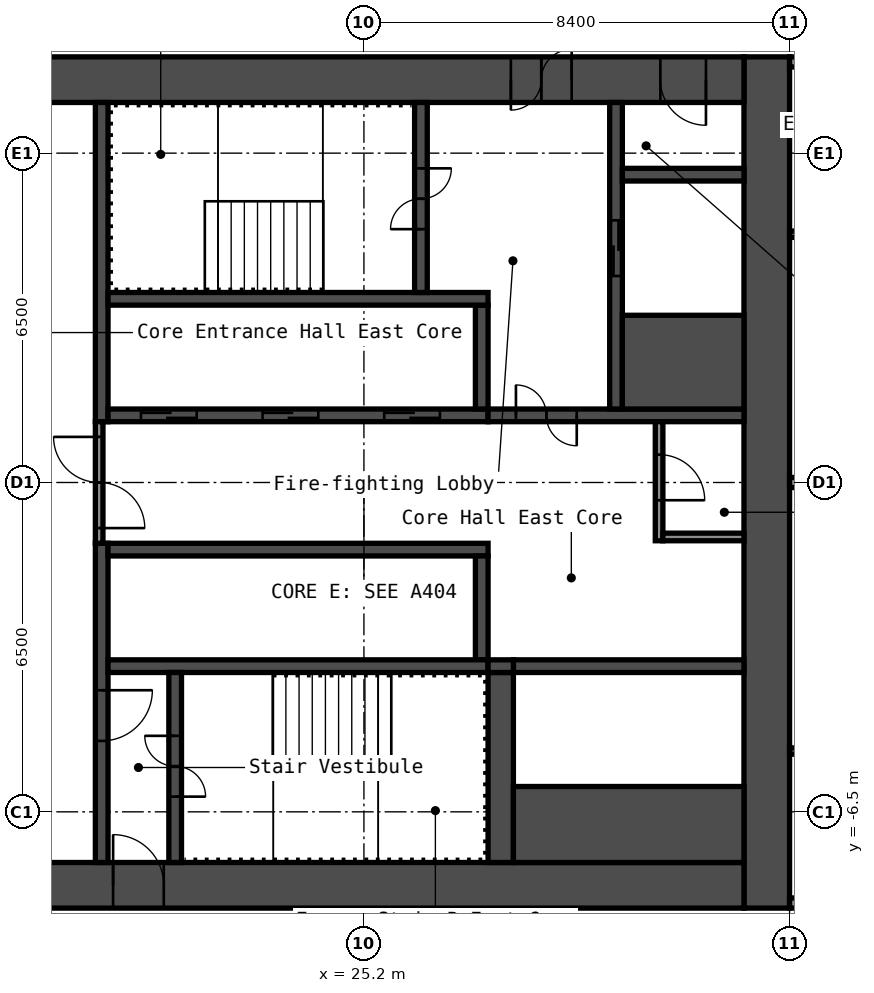
"""IFC4 building model, lengths in metres.
Left out: names, types, materials, properties, quantities, classifications, styles, units other than length and angle.
Written with IfcOpenShell. Run it as: python <this file> out.ifc"""

import sys

from ifc_helpers import new_model, si_unit, direction, frame, frame_2d, origin, place, context, subcontext, project, spatial, rectangle, extrude, element, fill, save


model = new_model("IFC4")
c1 = context("Model", 3, precision=1e-05, world=origin(), true_north=direction((0.0, 1.0)))
c2 = subcontext(c1, "Body", "Model", "MODEL_VIEW")
j1 = project(units=[si_unit("LENGTHUNIT", "METRE"), si_unit("PLANEANGLEUNIT", "RADIAN")], contexts=[c1])
p1 = place(None, origin())
s1 = spatial("IfcSite", under=j1, at=p1, CompositionType="ELEMENT")
p2 = place(p1, origin())
s2 = spatial("IfcBuilding", under=s1, at=p2, CompositionType="ELEMENT")
p3 = place(p2, frame((0.0, 0.0, 26.2)))
s3 = spatial("IfcBuildingStorey", under=s2, at=p3, CompositionType="ELEMENT", Elevation=26.2)
p4 = place(p3, frame((33.15, -8.4, 0.0), z_axis=(0.0, 0.0, 1.0), x_axis=(0.0, 1.0, 0.0)))
e1 = element("IfcWall", 1, at=p4, inside=s3, PredefinedType="SHEAR", context=c2, shape_type="SweptSolid", body=[
    extrude(rectangle(XDim=16.8, YDim=0.9, at=frame_2d((8.4, 0.0))), origin(), (0.0, 0.0, 1.0), 2.8),
])
p5 = place(p3, frame((17.7, 7.95, 0.0), z_axis=(0.0, 0.0, 1.0), x_axis=(1.0, 0.0, 0.0)))
e2 = element("IfcWall", 2, at=p5, inside=s3, PredefinedType="SHEAR", context=c2, shape_type="SweptSolid", body=[
    extrude(rectangle(XDim=15.0, YDim=0.9, at=frame_2d((7.5, 0.0))), origin(), (0.0, 0.0, 1.0), 2.8),
])
p6 = place(p5, frame((10.4, 0.0, 0.0)))
e3 = element("IfcOpeningElement", 3, at=p6, cuts=e2, PredefinedType="OPENING", context=c2, shape_type="SweptSolid", body=[
    extrude(rectangle(XDim=1.2, YDim=2.1, at=frame_2d((0.6, 1.05))), frame((0.0, 0.46, 0.0), z_axis=(0.0, -1.0, 0.0), x_axis=(1.0, 0.0, 0.0)), (0.0, 0.0, 1.0), 0.92),
])
p7 = place(p5, frame((13.35, 0.0, 0.0)))
e4 = element("IfcOpeningElement", 4, at=p7, cuts=e2, PredefinedType="OPENING", context=c2, shape_type="SweptSolid", body=[
    extrude(rectangle(XDim=0.9, YDim=2.1, at=frame_2d((0.45, 1.05))), frame((0.0, 0.46, 0.0), z_axis=(0.0, -1.0, 0.0), x_axis=(1.0, 0.0, 0.0)), (0.0, 0.0, 1.0), 0.92),
])
p8 = place(p3, frame((17.7, -7.95, 0.0), z_axis=(0.0, 0.0, 1.0), x_axis=(1.0, 0.0, 0.0)))
e5 = element("IfcWall", 5, at=p8, inside=s3, PredefinedType="SHEAR", context=c2, shape_type="SweptSolid", body=[
    extrude(rectangle(XDim=15.0, YDim=0.9, at=frame_2d((7.5, 0.0))), origin(), (0.0, 0.0, 1.0), 2.8),
])
p9 = place(p8, frame((2.55, 0.0, 0.0)))
e6 = element("IfcOpeningElement", 6, at=p9, cuts=e5, PredefinedType="OPENING", context=c2, shape_type="SweptSolid", body=[
    extrude(rectangle(XDim=1.0, YDim=2.1, at=frame_2d((0.5, 1.05))), frame((0.0, 0.46, 0.0), z_axis=(0.0, -1.0, 0.0), x_axis=(1.0, 0.0, 0.0)), (0.0, 0.0, 1.0), 0.92),
])
p10 = place(p3, frame((20.025, 1.2, 0.0), z_axis=(0.0, 0.0, 1.0), x_axis=(0.0, 1.0, 0.0)))
e7 = element("IfcWall", 7, at=p10, inside=s3, PredefinedType="SHEAR", context=c2, shape_type="SweptSolid", body=[
    extrude(rectangle(XDim=6.3, YDim=0.25, at=frame_2d((3.15, 0.0))), origin(), (0.0, 0.0, 1.0), 2.8),
])
p11 = place(p3, frame((20.025, -7.5, 0.0), z_axis=(0.0, 0.0, 1.0), x_axis=(0.0, 1.0, 0.0)))
e8 = element("IfcWall", 8, at=p11, inside=s3, PredefinedType="SHEAR", context=c2, shape_type="SweptSolid", body=[
    extrude(rectangle(XDim=6.3, YDim=0.25, at=frame_2d((3.15, 0.0))), origin(), (0.0, 0.0, 1.0), 2.8),
])
p12 = place(p11, frame((2.4, 0.0, 0.0)))
e9 = element("IfcOpeningElement", 9, at=p12, cuts=e8, PredefinedType="OPENING", context=c2, shape_type="SweptSolid", body=[
    extrude(rectangle(XDim=1.0, YDim=2.1, at=frame_2d((0.5, 1.05))), frame((0.0, 0.135, 0.0), z_axis=(0.0, -1.0, 0.0), x_axis=(1.0, 0.0, 0.0)), (0.0, 0.0, 1.0), 0.27),
])
p13 = place(p3, frame((20.15, 1.325, 0.0), z_axis=(0.0, 0.0, 1.0), x_axis=(1.0, 0.0, 0.0)))
e10 = element("IfcWall", 10, at=p13, inside=s3, PredefinedType="SHEAR", context=c2, shape_type="SweptSolid", body=[
    extrude(rectangle(XDim=7.5, YDim=0.25, at=frame_2d((3.75, 0.0))), origin(), (0.0, 0.0, 1.0), 2.8),
])
p14 = place(p13, frame((0.65, 0.0, 0.0)))
e11 = element("IfcOpeningElement", 11, at=p14, cuts=e10, PredefinedType="OPENING", context=c2, shape_type="SweptSolid", body=[
    extrude(rectangle(XDim=1.1, YDim=2.1, at=frame_2d((0.55, 1.05))), frame((0.0, 0.135, 0.0), z_axis=(0.0, -1.0, 0.0), x_axis=(1.0, 0.0, 0.0)), (0.0, 0.0, 1.0), 0.27),
])
p15 = place(p13, frame((3.05, 0.0, 0.0)))
e12 = element("IfcOpeningElement", 12, at=p15, cuts=e10, PredefinedType="OPENING", context=c2, shape_type="SweptSolid", body=[
    extrude(rectangle(XDim=1.1, YDim=2.1, at=frame_2d((0.55, 1.05))), frame((0.0, 0.135, 0.0), z_axis=(0.0, -1.0, 0.0), x_axis=(1.0, 0.0, 0.0)), (0.0, 0.0, 1.0), 0.27),
])
p16 = place(p13, frame((5.45, 0.0, 0.0)))
e13 = element("IfcOpeningElement", 13, at=p16, cuts=e10, PredefinedType="OPENING", context=c2, shape_type="SweptSolid", body=[
    extrude(rectangle(XDim=1.1, YDim=2.1, at=frame_2d((0.55, 1.05))), frame((0.0, 0.135, 0.0), z_axis=(0.0, -1.0, 0.0), x_axis=(1.0, 0.0, 0.0)), (0.0, 0.0, 1.0), 0.27),
])
p17 = place(p3, frame((27.525, 1.45, 0.0), z_axis=(0.0, 0.0, 1.0), x_axis=(0.0, 1.0, 0.0)))
e14 = element("IfcWall", 14, at=p17, inside=s3, PredefinedType="SHEAR", context=c2, shape_type="SweptSolid", body=[
    extrude(rectangle(XDim=2.05, YDim=0.25, at=frame_2d((1.025, 0.0))), origin(), (0.0, 0.0, 1.0), 2.8),
])
p18 = place(p3, frame((20.15, 3.625, 0.0), z_axis=(0.0, 0.0, 1.0), x_axis=(1.0, 0.0, 0.0)))
e15 = element("IfcWall", 15, at=p18, inside=s3, PredefinedType="SHEAR", context=c2, shape_type="SweptSolid", body=[
    extrude(rectangle(XDim=7.5, YDim=0.25, at=frame_2d((3.75, 0.0))), origin(), (0.0, 0.0, 1.0), 2.8),
])
p19 = place(p3, frame((26.325, 3.75, 0.0), z_axis=(0.0, 0.0, 1.0), x_axis=(0.0, 1.0, 0.0)))
e16 = element("IfcWall", 16, at=p19, inside=s3, PredefinedType="SHEAR", context=c2, shape_type="SweptSolid", body=[
    extrude(rectangle(XDim=3.75, YDim=0.25, at=frame_2d((1.875, 0.0))), origin(), (0.0, 0.0, 1.0), 2.8),
])
p20 = place(p19, frame((1.25, 0.0, 0.0)))
e17 = element("IfcOpeningElement", 17, at=p20, cuts=e16, PredefinedType="OPENING", context=c2, shape_type="SweptSolid", body=[
    extrude(rectangle(XDim=1.2, YDim=2.1, at=frame_2d((0.6, 1.05))), frame((0.0, 0.135, 0.0), z_axis=(0.0, -1.0, 0.0), x_axis=(1.0, 0.0, 0.0)), (0.0, 0.0, 1.0), 0.27),
])
p21 = place(p3, frame((27.65, 1.325, 0.0), z_axis=(0.0, 0.0, 1.0), x_axis=(1.0, 0.0, 0.0)))
e18 = element("IfcWall", 18, at=p21, inside=s3, PredefinedType="SHEAR", context=c2, shape_type="SweptSolid", body=[
    extrude(rectangle(XDim=5.05, YDim=0.25, at=frame_2d((2.525, 0.0))), origin(), (0.0, 0.0, 1.0), 2.8),
])
p22 = place(p21, frame((0.55, 0.0, 0.0)))
e19 = element("IfcOpeningElement", 19, at=p22, cuts=e18, PredefinedType="OPENING", context=c2, shape_type="SweptSolid", body=[
    extrude(rectangle(XDim=1.2, YDim=2.1, at=frame_2d((0.6, 1.05))), frame((0.0, 0.135, 0.0), z_axis=(0.0, -1.0, 0.0), x_axis=(1.0, 0.0, 0.0)), (0.0, 0.0, 1.0), 0.27),
])
p23 = place(p3, frame((30.175, 1.45, 0.0), z_axis=(0.0, 0.0, 1.0), x_axis=(0.0, 1.0, 0.0)))
e20 = element("IfcWall", 20, at=p23, inside=s3, PredefinedType="SHEAR", context=c2, shape_type="SweptSolid", body=[
    extrude(rectangle(XDim=6.05, YDim=0.25, at=frame_2d((3.025, 0.0))), origin(), (0.0, 0.0, 1.0), 2.8),
])
p24 = place(p23, frame((2.625, 0.0, 0.0)))
e21 = element("IfcOpeningElement", 21, at=p24, cuts=e20, PredefinedType="OPENING", context=c2, shape_type="SweptSolid", body=[
    extrude(rectangle(XDim=1.1, YDim=2.1, at=frame_2d((0.55, 1.05))), frame((0.0, 0.135, 0.0), z_axis=(0.0, -1.0, 0.0), x_axis=(1.0, 0.0, 0.0)), (0.0, 0.0, 1.0), 0.27),
])
p25 = place(p3, frame((30.3, 2.375, 0.0), z_axis=(0.0, 0.0, 1.0), x_axis=(1.0, 0.0, 0.0)))
e22 = element("IfcWall", 22, at=p25, inside=s3, PredefinedType="SHEAR", context=c2, shape_type="SweptSolid", body=[
    extrude(rectangle(XDim=2.4, YDim=1.85, at=frame_2d((1.2, 0.0))), origin(), (0.0, 0.0, 1.0), 2.8),
])
p26 = place(p3, frame((30.3, 6.075, 0.0), z_axis=(0.0, 0.0, 1.0), x_axis=(1.0, 0.0, 0.0)))
e23 = element("IfcWall", 23, at=p26, inside=s3, PredefinedType="SHEAR", context=c2, shape_type="SweptSolid", body=[
    extrude(rectangle(XDim=2.4, YDim=0.25, at=frame_2d((1.2, 0.0))), origin(), (0.0, 0.0, 1.0), 2.8),
])
p27 = place(p3, frame((20.15, -1.325, 0.0), z_axis=(0.0, 0.0, 1.0), x_axis=(1.0, 0.0, 0.0)))
e24 = element("IfcWall", 24, at=p27, inside=s3, PredefinedType="SHEAR", context=c2, shape_type="SweptSolid", body=[
    extrude(rectangle(XDim=7.5, YDim=0.25, at=frame_2d((3.75, 0.0))), origin(), (0.0, 0.0, 1.0), 2.8),
])
p28 = place(p3, frame((27.525, -3.5, 0.0), z_axis=(0.0, 0.0, 1.0), x_axis=(0.0, 1.0, 0.0)))
e25 = element("IfcWall", 25, at=p28, inside=s3, PredefinedType="SHEAR", context=c2, shape_type="SweptSolid", body=[
    extrude(rectangle(XDim=2.05, YDim=0.25, at=frame_2d((1.025, 0.0))), origin(), (0.0, 0.0, 1.0), 2.8),
])
p29 = place(p3, frame((20.15, -3.625, 0.0), z_axis=(0.0, 0.0, 1.0), x_axis=(1.0, 0.0, 0.0)))
e26 = element("IfcWall", 26, at=p29, inside=s3, PredefinedType="SHEAR", context=c2, shape_type="SweptSolid", body=[
    extrude(rectangle(XDim=7.5, YDim=0.25, at=frame_2d((3.75, 0.0))), origin(), (0.0, 0.0, 1.0), 2.8),
])
p30 = place(p3, frame((21.475, -7.5, 0.0), z_axis=(0.0, 0.0, 1.0), x_axis=(0.0, 1.0, 0.0)))
e27 = element("IfcWall", 27, at=p30, inside=s3, PredefinedType="SHEAR", context=c2, shape_type="SweptSolid", body=[
    extrude(rectangle(XDim=3.75, YDim=0.25, at=frame_2d((1.875, 0.0))), origin(), (0.0, 0.0, 1.0), 2.8),
])
p31 = place(p30, frame((1.3, 0.0, 0.0)))
e28 = element("IfcOpeningElement", 28, at=p31, cuts=e27, PredefinedType="OPENING", context=c2, shape_type="SweptSolid", body=[
    extrude(rectangle(XDim=1.2, YDim=2.1, at=frame_2d((0.6, 1.05))), frame((0.0, 0.135, 0.0), z_axis=(0.0, -1.0, 0.0), x_axis=(1.0, 0.0, 0.0)), (0.0, 0.0, 1.0), 0.27),
])
p32 = place(p3, frame((27.9, -7.5, 0.0), z_axis=(0.0, 0.0, 1.0), x_axis=(0.0, 1.0, 0.0)))
e29 = element("IfcWall", 29, at=p32, inside=s3, PredefinedType="SHEAR", context=c2, shape_type="SweptSolid", body=[
    extrude(rectangle(XDim=3.75, YDim=0.5, at=frame_2d((1.875, 0.0))), origin(), (0.0, 0.0, 1.0), 2.8),
])
p33 = place(p3, frame((28.15, -3.625, 0.0), z_axis=(0.0, 0.0, 1.0), x_axis=(1.0, 0.0, 0.0)))
e30 = element("IfcWall", 30, at=p33, inside=s3, PredefinedType="SHEAR", context=c2, shape_type="SweptSolid", body=[
    extrude(rectangle(XDim=4.55, YDim=0.25, at=frame_2d((2.275, 0.0))), origin(), (0.0, 0.0, 1.0), 2.8),
])
p34 = place(p3, frame((28.15, -6.75, 0.0), z_axis=(0.0, 0.0, 1.0), x_axis=(1.0, 0.0, 0.0)))
e31 = element("IfcWall", 31, at=p34, inside=s3, PredefinedType="SHEAR", context=c2, shape_type="SweptSolid", body=[
    extrude(rectangle(XDim=4.55, YDim=1.5, at=frame_2d((2.275, 0.0))), origin(), (0.0, 0.0, 1.0), 2.8),
])
p35 = place(p3, frame((27.65, -3.625, 0.0), z_axis=(0.0, 0.0, 1.0), x_axis=(1.0, 0.0, 0.0)))
e32 = element("IfcWall", 32, at=p35, inside=s3, PredefinedType="SHEAR", context=c2, shape_type="SweptSolid", body=[
    extrude(rectangle(XDim=0.5, YDim=0.25, at=frame_2d((0.25, 0.0))), origin(), (0.0, 0.0, 1.0), 2.8),
])
p36 = place(p3, frame((19.975, -1.2, 0.0), z_axis=(0.0, 0.0, 1.0), x_axis=(0.0, 1.0, 0.0)))
e33 = element("IfcWall", 33, at=p36, inside=s3, PredefinedType="PARTITIONING", context=c2, shape_type="SweptSolid", body=[
    extrude(rectangle(XDim=2.4, YDim=0.15, at=frame_2d((1.2, 0.0))), origin(), (0.0, 0.0, 1.0), 2.8),
])
p37 = place(p36, frame((0.3, 0.0, 0.0)))
e34 = element("IfcOpeningElement", 34, at=p37, cuts=e33, PredefinedType="OPENING", context=c2, shape_type="SweptSolid", body=[
    extrude(rectangle(XDim=1.8, YDim=2.1, at=frame_2d((0.9, 1.05))), frame((0.0, 0.085, 0.0), z_axis=(0.0, -1.0, 0.0), x_axis=(1.0, 0.0, 0.0)), (0.0, 0.0, 1.0), 0.17),
])
p38 = place(p3, frame((31.025, -1.15, 0.0), z_axis=(0.0, 0.0, 1.0), x_axis=(0.0, 1.0, 0.0)))
e35 = element("IfcWall", 35, at=p38, inside=s3, PredefinedType="PARTITIONING", context=c2, shape_type="SweptSolid", body=[
    extrude(rectangle(XDim=2.35, YDim=0.15, at=frame_2d((1.175, 0.0))), origin(), (0.0, 0.0, 1.0), 2.8),
])
p39 = place(p38, frame((0.8, 0.0, 0.0)))
e36 = element("IfcOpeningElement", 36, at=p39, cuts=e35, PredefinedType="OPENING", context=c2, shape_type="SweptSolid", body=[
    extrude(rectangle(XDim=0.9, YDim=2.1, at=frame_2d((0.45, 1.05))), frame((0.0, 0.085, 0.0), z_axis=(0.0, -1.0, 0.0), x_axis=(1.0, 0.0, 0.0)), (0.0, 0.0, 1.0), 0.17),
])
p40 = place(p3, frame((31.1, -1.075, 0.0), z_axis=(0.0, 0.0, 1.0), x_axis=(1.0, 0.0, 0.0)))
e37 = element("IfcWall", 37, at=p40, inside=s3, PredefinedType="PARTITIONING", context=c2, shape_type="SweptSolid", body=[
    extrude(rectangle(XDim=1.6, YDim=0.15, at=frame_2d((0.8, 0.0))), origin(), (0.0, 0.0, 1.0), 2.8),
])
p41 = place(p3, frame((33.6, -8.3, 0.0), z_axis=(0.0, 0.0, 1.0), x_axis=(1.0, 0.0, 0.0)))
e38 = element("IfcWall", 38, at=p41, inside=s3, PredefinedType="PARTITIONING", context=c2, shape_type="SweptSolid", body=[
    extrude(rectangle(XDim=15.0, YDim=0.2, at=frame_2d((7.5, 0.0))), origin(), (0.0, 0.0, 1.0), 2.8),
])
p42 = place(p41, frame((2.85, 0.0, 0.0)))
e39 = element("IfcOpeningElement", 39, at=p42, cuts=e38, PredefinedType="OPENING", context=c2, shape_type="SweptSolid", body=[
    extrude(rectangle(XDim=1.0, YDim=2.1, at=frame_2d((0.5, 1.05))), frame((0.0, 0.11, 0.0), z_axis=(0.0, -1.0, 0.0), x_axis=(1.0, 0.0, 0.0)), (0.0, 0.0, 1.0), 0.22),
])
p43 = place(p41, frame((4.55, 0.0, 0.0)))
e40 = element("IfcOpeningElement", 40, at=p43, cuts=e38, PredefinedType="OPENING", context=c2, shape_type="SweptSolid", body=[
    extrude(rectangle(XDim=1.0, YDim=2.1, at=frame_2d((0.5, 1.05))), frame((0.0, 0.11, 0.0), z_axis=(0.0, -1.0, 0.0), x_axis=(1.0, 0.0, 0.0)), (0.0, 0.0, 1.0), 0.22),
])
p44 = place(p41, frame((9.55, 0.0, 0.0)))
e41 = element("IfcOpeningElement", 41, at=p44, cuts=e38, PredefinedType="OPENING", context=c2, shape_type="SweptSolid", body=[
    extrude(rectangle(XDim=1.0, YDim=2.1, at=frame_2d((0.5, 1.05))), frame((0.0, 0.11, 0.0), z_axis=(0.0, -1.0, 0.0), x_axis=(1.0, 0.0, 0.0)), (0.0, 0.0, 1.0), 0.22),
])
p45 = place(p3, frame((33.6, -5.3, 0.0), z_axis=(0.0, 0.0, 1.0), x_axis=(1.0, 0.0, 0.0)))
e42 = element("IfcWall", 42, at=p45, inside=s3, PredefinedType="PARTITIONING", context=c2, shape_type="SweptSolid", body=[
    extrude(rectangle(XDim=2.438, YDim=0.125, at=frame_2d((1.219, 0.0))), origin(), (0.0, 0.0, 1.0), 2.8),
])
p46 = place(p3, frame((33.6, 0.0, 0.0), z_axis=(0.0, 0.0, 1.0), x_axis=(1.0, 0.0, 0.0)))
e43 = element("IfcWall", 43, at=p46, inside=s3, PredefinedType="PARTITIONING", context=c2, shape_type="SweptSolid", body=[
    extrude(rectangle(XDim=14.9, YDim=0.2, at=frame_2d((7.45, 0.0))), origin(), (0.0, 0.0, 1.0), 2.8),
])
p47 = place(p3, frame((33.6, 4.9, 0.0), z_axis=(0.0, 0.0, 1.0), x_axis=(1.0, 0.0, 0.0)))
e44 = element("IfcWall", 44, at=p47, inside=s3, PredefinedType="PARTITIONING", context=c2, shape_type="SweptSolid", body=[
    extrude(rectangle(XDim=3.337, YDim=0.125, at=frame_2d((1.669, 0.0))), origin(), (0.0, 0.0, 1.0), 2.8),
])
p48 = place(p47, frame((1.3, 0.0, 0.0)))
e45 = element("IfcOpeningElement", 45, at=p48, cuts=e44, PredefinedType="OPENING", context=c2, shape_type="SweptSolid", body=[
    extrude(rectangle(XDim=0.8, YDim=2.1, at=frame_2d((0.4, 1.05))), frame((0.0, 0.073, 0.0), z_axis=(0.0, -1.0, 0.0), x_axis=(1.0, 0.0, 0.0)), (0.0, 0.0, 1.0), 0.145),
])
p49 = place(p3, frame((33.6, 8.3, 0.0), z_axis=(0.0, 0.0, 1.0), x_axis=(1.0, 0.0, 0.0)))
e46 = element("IfcWall", 46, at=p49, inside=s3, PredefinedType="PARTITIONING", context=c2, shape_type="SweptSolid", body=[
    extrude(rectangle(XDim=15.0, YDim=0.2, at=frame_2d((7.5, 0.0))), origin(), (0.0, 0.0, 1.0), 2.8),
])
p50 = place(p49, frame((5.4, 0.0, 0.0)))
e47 = element("IfcOpeningElement", 47, at=p50, cuts=e46, PredefinedType="OPENING", context=c2, shape_type="SweptSolid", body=[
    extrude(rectangle(XDim=1.0, YDim=2.1, at=frame_2d((0.5, 1.05))), frame((0.0, 0.11, 0.0), z_axis=(0.0, -1.0, 0.0), x_axis=(1.0, 0.0, 0.0)), (0.0, 0.0, 1.0), 0.22),
])
p51 = place(p49, frame((9.55, 0.0, 0.0)))
e48 = element("IfcOpeningElement", 48, at=p51, cuts=e46, PredefinedType="OPENING", context=c2, shape_type="SweptSolid", body=[
    extrude(rectangle(XDim=1.0, YDim=2.1, at=frame_2d((0.5, 1.05))), frame((0.0, 0.11, 0.0), z_axis=(0.0, -1.0, 0.0), x_axis=(1.0, 0.0, 0.0)), (0.0, 0.0, 1.0), 0.22),
])
p52 = place(p6, origin())
e49 = element("IfcDoor", 49, at=p52, inside=s3, OperationType="DOUBLE_DOOR_SINGLE_SWING", PredefinedType="DOOR", context=c2, shape_type="SweptSolid", body=[
    extrude(rectangle(XDim=1.2, YDim=2.1, at=frame_2d((0.6, 1.05))), frame((0.0, 0.025, 0.0), z_axis=(0.0, -1.0, 0.0), x_axis=(1.0, 0.0, 0.0)), (0.0, 0.0, 1.0), 0.05),
])
fill(e3, e49)
p53 = place(p7, origin())
e50 = element("IfcDoor", 50, at=p53, inside=s3, OperationType="SINGLE_SWING_RIGHT", PredefinedType="DOOR", context=c2, shape_type="SweptSolid", body=[
    extrude(rectangle(XDim=0.9, YDim=2.1, at=frame_2d((0.45, 1.05))), frame((0.0, 0.025, 0.0), z_axis=(0.0, -1.0, 0.0), x_axis=(1.0, 0.0, 0.0)), (0.0, 0.0, 1.0), 0.05),
])
fill(e4, e50)
p54 = place(p9, origin())
e51 = element("IfcDoor", 51, at=p54, inside=s3, OperationType="SINGLE_SWING_RIGHT", PredefinedType="DOOR", context=c2, shape_type="SweptSolid", body=[
    extrude(rectangle(XDim=1.0, YDim=2.1, at=frame_2d((0.5, 1.05))), frame((0.0, 0.025, 0.0), z_axis=(0.0, -1.0, 0.0), x_axis=(1.0, 0.0, 0.0)), (0.0, 0.0, 1.0), 0.05),
])
fill(e6, e51)
p55 = place(p20, origin())
e52 = element("IfcDoor", 52, at=p55, inside=s3, OperationType="DOUBLE_DOOR_SINGLE_SWING", PredefinedType="DOOR", context=c2, shape_type="SweptSolid", body=[
    extrude(rectangle(XDim=1.2, YDim=2.1, at=frame_2d((0.6, 1.05))), frame((0.0, 0.025, 0.0), z_axis=(0.0, -1.0, 0.0), x_axis=(1.0, 0.0, 0.0)), (0.0, 0.0, 1.0), 0.05),
])
fill(e17, e52)
p56 = place(p31, origin())
e53 = element("IfcDoor", 53, at=p56, inside=s3, OperationType="DOUBLE_DOOR_SINGLE_SWING", PredefinedType="DOOR", context=c2, shape_type="SweptSolid", body=[
    extrude(rectangle(XDim=1.2, YDim=2.1, at=frame_2d((0.6, 1.05))), frame((0.0, 0.025, 0.0), z_axis=(0.0, -1.0, 0.0), x_axis=(1.0, 0.0, 0.0)), (0.0, 0.0, 1.0), 0.05),
])
fill(e28, e53)
p57 = place(p12, origin())
e54 = element("IfcDoor", 54, at=p57, inside=s3, OperationType="SINGLE_SWING_RIGHT", PredefinedType="DOOR", context=c2, shape_type="SweptSolid", body=[
    extrude(rectangle(XDim=1.0, YDim=2.1, at=frame_2d((0.5, 1.05))), frame((0.0, 0.025, 0.0), z_axis=(0.0, -1.0, 0.0), x_axis=(1.0, 0.0, 0.0)), (0.0, 0.0, 1.0), 0.05),
])
fill(e9, e54)
p58 = place(p22, origin())
e55 = element("IfcDoor", 55, at=p58, inside=s3, OperationType="DOUBLE_DOOR_SINGLE_SWING", PredefinedType="DOOR", context=c2, shape_type="SweptSolid", body=[
    extrude(rectangle(XDim=1.2, YDim=2.1, at=frame_2d((0.6, 1.05))), frame((0.0, 0.025, 0.0), z_axis=(0.0, -1.0, 0.0), x_axis=(1.0, 0.0, 0.0)), (0.0, 0.0, 1.0), 0.05),
])
fill(e19, e55)
p59 = place(p37, origin())
e56 = element("IfcDoor", 56, at=p59, inside=s3, OperationType="DOUBLE_DOOR_SINGLE_SWING", PredefinedType="DOOR", context=c2, shape_type="SweptSolid", body=[
    extrude(rectangle(XDim=1.8, YDim=2.1, at=frame_2d((0.9, 1.05))), frame((0.0, 0.025, 0.0), z_axis=(0.0, -1.0, 0.0), x_axis=(1.0, 0.0, 0.0)), (0.0, 0.0, 1.0), 0.05),
])
fill(e34, e56)
p60 = place(p39, origin())
e57 = element("IfcDoor", 57, at=p60, inside=s3, OperationType="SINGLE_SWING_LEFT", PredefinedType="DOOR", context=c2, shape_type="SweptSolid", body=[
    extrude(rectangle(XDim=0.9, YDim=2.1, at=frame_2d((0.45, 1.05))), frame((0.0, 0.025, 0.0), z_axis=(0.0, -1.0, 0.0), x_axis=(1.0, 0.0, 0.0)), (0.0, 0.0, 1.0), 0.05),
])
fill(e36, e57)
p61 = place(p14, origin())
e58 = element("IfcDoor", 58, at=p61, inside=s3, OperationType="DOUBLE_DOOR_SLIDING", PredefinedType="DOOR", context=c2, shape_type="SweptSolid", body=[
    extrude(rectangle(XDim=1.1, YDim=2.1, at=frame_2d((0.55, 1.05))), frame((0.0, 0.025, 0.0), z_axis=(0.0, -1.0, 0.0), x_axis=(1.0, 0.0, 0.0)), (0.0, 0.0, 1.0), 0.05),
])
fill(e11, e58)
p62 = place(p15, origin())
e59 = element("IfcDoor", 59, at=p62, inside=s3, OperationType="DOUBLE_DOOR_SLIDING", PredefinedType="DOOR", context=c2, shape_type="SweptSolid", body=[
    extrude(rectangle(XDim=1.1, YDim=2.1, at=frame_2d((0.55, 1.05))), frame((0.0, 0.025, 0.0), z_axis=(0.0, -1.0, 0.0), x_axis=(1.0, 0.0, 0.0)), (0.0, 0.0, 1.0), 0.05),
])
fill(e12, e59)
p63 = place(p16, origin())
e60 = element("IfcDoor", 60, at=p63, inside=s3, OperationType="DOUBLE_DOOR_SLIDING", PredefinedType="DOOR", context=c2, shape_type="SweptSolid", body=[
    extrude(rectangle(XDim=1.1, YDim=2.1, at=frame_2d((0.55, 1.05))), frame((0.0, 0.025, 0.0), z_axis=(0.0, -1.0, 0.0), x_axis=(1.0, 0.0, 0.0)), (0.0, 0.0, 1.0), 0.05),
])
fill(e13, e60)
p64 = place(p24, origin())
e61 = element("IfcDoor", 61, at=p64, inside=s3, OperationType="DOUBLE_DOOR_SLIDING", PredefinedType="DOOR", context=c2, shape_type="SweptSolid", body=[
    extrude(rectangle(XDim=1.1, YDim=2.1, at=frame_2d((0.55, 1.05))), frame((0.0, 0.025, 0.0), z_axis=(0.0, -1.0, 0.0), x_axis=(1.0, 0.0, 0.0)), (0.0, 0.0, 1.0), 0.05),
])
fill(e21, e61)
save(model, sys.argv[1])
